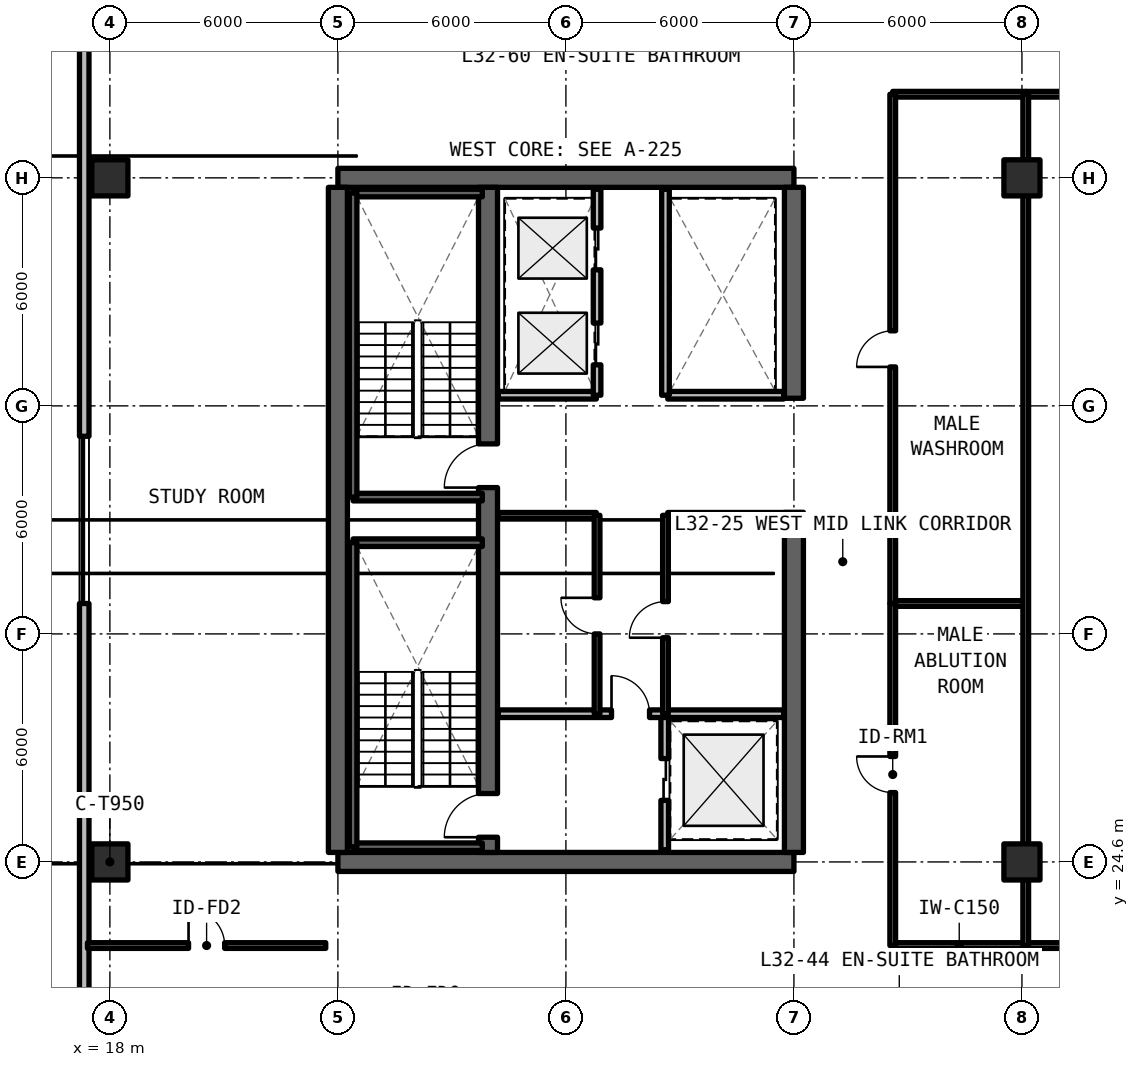
"""IFC4 building model, lengths in metres.
Left out: names, types, materials, properties, quantities, classifications, styles, units other than length and angle.
Written with IfcOpenShell. Run it as: python <this file> out.ifc"""

import sys

from ifc_helpers import new_model, si_unit, direction, frame, frame_2d, origin, origin_2d, place, context, subcontext, project, spatial, rectangle, extrude, element, fill, save


model = new_model("IFC4")
c1 = context("Model", 3, precision=1e-05, world=origin(), true_north=direction((0.0, 1.0)))
c2 = subcontext(c1, "Body", "Model", "MODEL_VIEW")
j1 = project(units=[si_unit("LENGTHUNIT", "METRE"), si_unit("PLANEANGLEUNIT", "RADIAN")], contexts=[c1])
p1 = place(None, origin())
s1 = spatial("IfcSite", under=j1, at=p1, CompositionType="ELEMENT")
p2 = place(p1, origin())
s2 = spatial("IfcBuilding", under=s1, at=p2, CompositionType="ELEMENT")
p3 = place(p2, frame((0.0, 0.0, 115.83)))
s3 = spatial("IfcBuildingStorey", under=s2, at=p3, CompositionType="ELEMENT", Elevation=115.83)
for number, where, z_axis, x_axis in (
    (1, (24.0, 24.6, 0.0), (0.0, 0.0, 1.0), (1.0, 0.0, 0.0)),
    (2, (36.0, 42.6, 0.0), (0.0, 0.0, 1.0), (-1.0, 0.0, 0.0)),
):
    element("IfcWall", number, at=place(p3, frame(where, z_axis=z_axis, x_axis=x_axis)), inside=s3, PredefinedType="SHEAR", context=c2, shape_type="SweptSolid", body=[
        extrude(rectangle(XDim=12.0, YDim=0.5, at=frame_2d((6.0, 0.0))), origin(), (0.0, 0.0, 1.0), 3.63),
    ])
p4 = place(p3, frame((24.0, 24.85, 0.0), z_axis=(0.0, 0.0, 1.0), x_axis=(0.0, 1.0, 0.0)))
e3 = element("IfcWall", 3, at=p4, inside=s3, PredefinedType="SHEAR", context=c2, shape_type="SweptSolid", body=[
    extrude(rectangle(XDim=17.5, YDim=0.5, at=frame_2d((8.75, 0.0))), origin(), (0.0, 0.0, 1.0), 3.63),
])
p5 = place(p3, frame((36.0, 24.85, 0.0), z_axis=(0.0, 0.0, 1.0), x_axis=(0.0, 1.0, 0.0)))
e4 = element("IfcWall", 4, at=p5, inside=s3, PredefinedType="SHEAR", context=c2, shape_type="SweptSolid", body=[
    extrude(rectangle(XDim=8.95, YDim=0.5, at=frame_2d((4.475, 0.0))), origin(), (0.0, 0.0, 1.0), 3.63),
])
p6 = place(p3, frame((36.0, 36.8, 0.0), z_axis=(0.0, 0.0, 1.0), x_axis=(0.0, 1.0, 0.0)))
e5 = element("IfcWall", 5, at=p6, inside=s3, PredefinedType="SHEAR", context=c2, shape_type="SweptSolid", body=[
    extrude(rectangle(XDim=5.55, YDim=0.5, at=frame_2d((2.775, 0.0))), origin(), (0.0, 0.0, 1.0), 3.63),
])
p7 = place(p3, frame((27.95, 24.85, 0.0), z_axis=(0.0, 0.0, 1.0), x_axis=(0.0, 1.0, 0.0)))
e6 = element("IfcWall", 6, at=p7, inside=s3, PredefinedType="SHEAR", context=c2, shape_type="SweptSolid", body=[
    extrude(rectangle(XDim=17.5, YDim=0.5, at=frame_2d((8.75, 0.0))), origin(), (0.0, 0.0, 1.0), 3.63),
])
p8 = place(p7, frame((0.4, 0.0, 0.0)))
e7 = element("IfcOpeningElement", 7, at=p8, cuts=e6, PredefinedType="OPENING", context=c2, shape_type="SweptSolid", body=[
    extrude(rectangle(XDim=1.15, YDim=2.15, at=frame_2d((0.575, 1.075))), frame((0.0, 0.26, 0.0), z_axis=(0.0, -1.0, 0.0), x_axis=(1.0, 0.0, 0.0)), (0.0, 0.0, 1.0), 0.52),
])
p9 = place(p7, frame((9.6, 0.0, 0.0)))
e8 = element("IfcOpeningElement", 8, at=p9, cuts=e6, PredefinedType="OPENING", context=c2, shape_type="SweptSolid", body=[
    extrude(rectangle(XDim=1.15, YDim=2.15, at=frame_2d((0.575, 1.075))), frame((0.0, 0.26, 0.0), z_axis=(0.0, -1.0, 0.0), x_axis=(1.0, 0.0, 0.0)), (0.0, 0.0, 1.0), 0.52),
])
for number, where, z_axis, x_axis in (
    (9, (18.0, 24.6, 0.0), (0.0, 0.0, 1.0), (1.0, 0.0, 0.0)),
    (10, (18.0, 42.6, 0.0), (0.0, 0.0, 1.0), (1.0, 0.0, 0.0)),
    (11, (42.0, 24.6, 0.0), (0.0, 0.0, 1.0), (1.0, 0.0, 0.0)),
    (12, (42.0, 42.6, 0.0), (0.0, 0.0, 1.0), (1.0, 0.0, 0.0)),
):
    element("IfcColumn", number, at=place(p3, frame(where, z_axis=z_axis, x_axis=x_axis)), inside=s3, PredefinedType="COLUMN", context=c2, shape_type="SweptSolid", body=[
        extrude(rectangle(XDim=0.95, YDim=0.95, at=origin_2d()), origin(), (0.0, 0.0, 1.0), 3.63),
    ])
p10 = place(p3, frame((17.325, 53.348, 0.0), z_axis=(0.0, 0.0, 1.0), x_axis=(0.0, -1.0, 0.0)))
e13 = element("IfcWall", 13, at=p10, inside=s3, PredefinedType="SOLIDWALL", context=c2, shape_type="SweptSolid", body=[
    extrude(rectangle(XDim=39.496, YDim=0.25, at=frame_2d((19.748, 0.0))), origin(), (0.0, 0.0, 1.0), 3.41),
])
p11 = place(p10, frame((1.698, 0.0, 0.0)))
e14 = element("IfcOpeningElement", 14, at=p11, cuts=e13, PredefinedType="OPENING", context=c2, shape_type="SweptSolid", body=[
    extrude(rectangle(XDim=1.1, YDim=2.15, at=frame_2d((0.55, 1.075))), frame((0.0, 0.135, 0.0), z_axis=(0.0, -1.0, 0.0), x_axis=(1.0, 0.0, 0.0)), (0.0, 0.0, 1.0), 0.27),
])
p12 = place(p10, frame((17.548, 0.0, 0.78)))
e15 = element("IfcOpeningElement", 15, at=p12, cuts=e13, PredefinedType="OPENING", context=c2, shape_type="SweptSolid", body=[
    extrude(rectangle(XDim=4.4, YDim=1.66, at=frame_2d((2.2, 0.83))), frame((0.0, 0.135, 0.0), z_axis=(0.0, -1.0, 0.0), x_axis=(1.0, 0.0, 0.0)), (0.0, 0.0, 1.0), 0.27),
])
p13 = place(p10, frame((35.642, 0.0, 0.78)))
e16 = element("IfcOpeningElement", 16, at=p13, cuts=e13, PredefinedType="OPENING", context=c2, shape_type="SweptSolid", body=[
    extrude(rectangle(XDim=1.4, YDim=1.65, at=frame_2d((0.7, 0.825))), frame((0.0, 0.135, 0.0), z_axis=(0.0, -1.0, 0.0), x_axis=(1.0, 0.0, 0.0)), (0.0, 0.0, 1.0), 0.27),
])
p14 = place(p3, frame((32.6, 24.92, 0.0), z_axis=(0.0, 0.0, 1.0), x_axis=(0.0, 1.0, 0.0)))
e17 = element("IfcWall", 17, at=p14, inside=s3, PredefinedType="SOLIDWALL", context=c2, shape_type="SweptSolid", body=[
    extrude(rectangle(XDim=3.58, YDim=0.2, at=frame_2d((1.79, 0.0))), origin(), (0.0, 0.0, 1.0), 2.63),
])
p15 = place(p14, frame((1.3, 0.0, 0.0)))
e18 = element("IfcOpeningElement", 18, at=p15, cuts=e17, PredefinedType="OPENING", context=c2, shape_type="SweptSolid", body=[
    extrude(rectangle(XDim=1.1, YDim=2.2, at=frame_2d((0.55, 1.1))), frame((0.0, 0.11, 0.0), z_axis=(0.0, -1.0, 0.0), x_axis=(1.0, 0.0, 0.0)), (0.0, 0.0, 1.0), 0.22),
])
p16 = place(p3, frame((28.22, 28.5, 0.0), z_axis=(0.0, 0.0, 1.0), x_axis=(1.0, 0.0, 0.0)))
e19 = element("IfcWall", 19, at=p16, inside=s3, PredefinedType="SOLIDWALL", context=c2, shape_type="SweptSolid", body=[
    extrude(rectangle(XDim=7.51, YDim=0.2, at=frame_2d((3.755, 0.0))), origin(), (0.0, 0.0, 1.0), 2.63),
])
p17 = place(p16, frame((2.98, 0.0, 0.0)))
e20 = element("IfcOpeningElement", 20, at=p17, cuts=e19, PredefinedType="OPENING", context=c2, shape_type="SweptSolid", body=[
    extrude(rectangle(XDim=1.0, YDim=2.15, at=frame_2d((0.5, 1.075))), frame((0.0, 0.11, 0.0), z_axis=(0.0, -1.0, 0.0), x_axis=(1.0, 0.0, 0.0)), (0.0, 0.0, 1.0), 0.22),
])
p18 = place(p3, frame((28.22, 33.72, 0.0), z_axis=(0.0, 0.0, 1.0), x_axis=(1.0, 0.0, 0.0)))
e21 = element("IfcWall", 21, at=p18, inside=s3, PredefinedType="SOLIDWALL", context=c2, shape_type="SweptSolid", body=[
    extrude(rectangle(XDim=2.58, YDim=0.15, at=frame_2d((1.29, 0.0))), origin(), (0.0, 0.0, 1.0), 2.63),
])
p19 = place(p3, frame((30.82, 28.5, 0.0), z_axis=(0.0, 0.0, 1.0), x_axis=(0.0, 1.0, 0.0)))
e22 = element("IfcWall", 22, at=p19, inside=s3, PredefinedType="SOLIDWALL", context=c2, shape_type="SweptSolid", body=[
    extrude(rectangle(XDim=5.22, YDim=0.15, at=frame_2d((2.61, 0.0))), origin(), (0.0, 0.0, 1.0), 2.63),
])
p20 = place(p19, frame((2.1, 0.0, 0.0)))
e23 = element("IfcOpeningElement", 23, at=p20, cuts=e22, PredefinedType="OPENING", context=c2, shape_type="SweptSolid", body=[
    extrude(rectangle(XDim=0.95, YDim=2.15, at=frame_2d((0.475, 1.075))), frame((0.0, 0.085, 0.0), z_axis=(0.0, -1.0, 0.0), x_axis=(1.0, 0.0, 0.0)), (0.0, 0.0, 1.0), 0.17),
])
p21 = place(p3, frame((32.68, 33.72, 0.0), z_axis=(0.0, 0.0, 1.0), x_axis=(1.0, 0.0, 0.0)))
e24 = element("IfcWall", 24, at=p21, inside=s3, PredefinedType="SOLIDWALL", context=c2, shape_type="SweptSolid", body=[
    extrude(rectangle(XDim=3.05, YDim=0.15, at=frame_2d((1.525, 0.0))), origin(), (0.0, 0.0, 1.0), 2.63),
])
p22 = place(p3, frame((32.62, 28.5, 0.0), z_axis=(0.0, 0.0, 1.0), x_axis=(0.0, 1.0, 0.0)))
e25 = element("IfcWall", 25, at=p22, inside=s3, PredefinedType="SOLIDWALL", context=c2, shape_type="SweptSolid", body=[
    extrude(rectangle(XDim=5.22, YDim=0.15, at=frame_2d((2.61, 0.0))), origin(), (0.0, 0.0, 1.0), 2.63),
])
p23 = place(p22, frame((2.0, 0.0, 0.0)))
e26 = element("IfcOpeningElement", 26, at=p23, cuts=e25, PredefinedType="OPENING", context=c2, shape_type="SweptSolid", body=[
    extrude(rectangle(XDim=0.95, YDim=2.15, at=frame_2d((0.475, 1.075))), frame((0.0, 0.085, 0.0), z_axis=(0.0, -1.0, 0.0), x_axis=(1.0, 0.0, 0.0)), (0.0, 0.0, 1.0), 0.17),
])
p24 = place(p3, frame((28.22, 36.88, 0.0), z_axis=(0.0, 0.0, 1.0), x_axis=(1.0, 0.0, 0.0)))
e27 = element("IfcWall", 27, at=p24, inside=s3, PredefinedType="SOLIDWALL", context=c2, shape_type="SweptSolid", body=[
    extrude(rectangle(XDim=2.58, YDim=0.2, at=frame_2d((1.29, 0.0))), origin(), (0.0, 0.0, 1.0), 2.63),
])
p25 = place(p3, frame((30.82, 36.88, 0.0), z_axis=(0.0, 0.0, 1.0), x_axis=(0.0, 1.0, 0.0)))
e28 = element("IfcWall", 28, at=p25, inside=s3, PredefinedType="SOLIDWALL", context=c2, shape_type="SweptSolid", body=[
    extrude(rectangle(XDim=5.42, YDim=0.2, at=frame_2d((2.71, 0.0))), origin(), (0.0, 0.0, 1.0), 2.63),
])
p26 = place(p25, frame((0.8, 0.0, 0.0)))
e29 = element("IfcOpeningElement", 29, at=p26, cuts=e28, PredefinedType="OPENING", context=c2, shape_type="SweptSolid", body=[
    extrude(rectangle(XDim=1.1, YDim=2.2, at=frame_2d((0.55, 1.1))), frame((0.0, 0.11, 0.0), z_axis=(0.0, -1.0, 0.0), x_axis=(1.0, 0.0, 0.0)), (0.0, 0.0, 1.0), 0.22),
])
p27 = place(p25, frame((3.3, 0.0, 0.0)))
e30 = element("IfcOpeningElement", 30, at=p27, cuts=e28, PredefinedType="OPENING", context=c2, shape_type="SweptSolid", body=[
    extrude(rectangle(XDim=1.1, YDim=2.2, at=frame_2d((0.55, 1.1))), frame((0.0, 0.11, 0.0), z_axis=(0.0, -1.0, 0.0), x_axis=(1.0, 0.0, 0.0)), (0.0, 0.0, 1.0), 0.22),
])
p28 = place(p3, frame((32.68, 36.88, 0.0), z_axis=(0.0, 0.0, 1.0), x_axis=(1.0, 0.0, 0.0)))
e31 = element("IfcWall", 31, at=p28, inside=s3, PredefinedType="SOLIDWALL", context=c2, shape_type="SweptSolid", body=[
    extrude(rectangle(XDim=3.05, YDim=0.2, at=frame_2d((1.525, 0.0))), origin(), (0.0, 0.0, 1.0), 2.63),
])
p29 = place(p3, frame((32.62, 36.88, 0.0), z_axis=(0.0, 0.0, 1.0), x_axis=(0.0, 1.0, 0.0)))
e32 = element("IfcWall", 32, at=p29, inside=s3, PredefinedType="SOLIDWALL", context=c2, shape_type="SweptSolid", body=[
    extrude(rectangle(XDim=5.42, YDim=0.2, at=frame_2d((2.71, 0.0))), origin(), (0.0, 0.0, 1.0), 2.63),
])
for number, where, z_axis, x_axis in (
    (33, (38.6, 22.4, 0.0), (0.0, 0.0, 1.0), (1.0, 0.0, 0.0)),
    (34, (38.6, 31.4, 0.0), (0.0, 0.0, 1.0), (1.0, 0.0, 0.0)),
):
    element("IfcWall", number, at=place(p3, frame(where, z_axis=z_axis, x_axis=x_axis)), inside=s3, PredefinedType="SOLIDWALL", context=c2, shape_type="SweptSolid", body=[
        extrude(rectangle(XDim=3.5, YDim=0.15, at=frame_2d((1.75, 0.0))), origin(), (0.0, 0.0, 1.0), 2.63),
    ])
p30 = place(p3, frame((38.6, 22.4, 0.0), z_axis=(0.0, 0.0, 1.0), x_axis=(0.0, 1.0, 0.0)))
e35 = element("IfcWall", 35, at=p30, inside=s3, PredefinedType="SOLIDWALL", context=c2, shape_type="SweptSolid", body=[
    extrude(rectangle(XDim=9.0, YDim=0.15, at=frame_2d((4.5, 0.0))), origin(), (0.0, 0.0, 1.0), 2.63),
])
p31 = place(p30, frame((4.025, 0.0, 0.0)))
e36 = element("IfcOpeningElement", 36, at=p31, cuts=e35, PredefinedType="OPENING", context=c2, shape_type="SweptSolid", body=[
    extrude(rectangle(XDim=0.95, YDim=2.15, at=frame_2d((0.475, 1.075))), frame((0.0, 0.085, 0.0), z_axis=(0.0, -1.0, 0.0), x_axis=(1.0, 0.0, 0.0)), (0.0, 0.0, 1.0), 0.17),
])
p32 = place(p3, frame((38.6, 44.8, 0.0), z_axis=(0.0, 0.0, 1.0), x_axis=(1.0, 0.0, 0.0)))
e37 = element("IfcWall", 37, at=p32, inside=s3, PredefinedType="SOLIDWALL", context=c2, shape_type="SweptSolid", body=[
    extrude(rectangle(XDim=3.5, YDim=0.15, at=frame_2d((1.75, 0.0))), origin(), (0.0, 0.0, 1.0), 2.63),
])
p33 = place(p3, frame((38.6, 31.4, 0.0), z_axis=(0.0, 0.0, 1.0), x_axis=(0.0, 1.0, 0.0)))
e38 = element("IfcWall", 38, at=p33, inside=s3, PredefinedType="SOLIDWALL", context=c2, shape_type="SweptSolid", body=[
    extrude(rectangle(XDim=13.4, YDim=0.15, at=frame_2d((6.7, 0.0))), origin(), (0.0, 0.0, 1.0), 2.63),
])
p34 = place(p33, frame((6.225, 0.0, 0.0)))
e39 = element("IfcOpeningElement", 39, at=p34, cuts=e38, PredefinedType="OPENING", context=c2, shape_type="SweptSolid", body=[
    extrude(rectangle(XDim=0.95, YDim=2.15, at=frame_2d((0.475, 1.075))), frame((0.0, 0.085, 0.0), z_axis=(0.0, -1.0, 0.0), x_axis=(1.0, 0.0, 0.0)), (0.0, 0.0, 1.0), 0.17),
])
p35 = place(p3, frame((42.1, 22.4, 0.0), z_axis=(0.0, 0.0, 1.0), x_axis=(1.0, 0.0, 0.0)))
e40 = element("IfcWall", 40, at=p35, inside=s3, PredefinedType="SOLIDWALL", context=c2, shape_type="SweptSolid", body=[
    extrude(rectangle(XDim=29.0, YDim=0.15, at=frame_2d((14.5, 0.0))), origin(), (0.0, 0.0, 1.0), 2.63),
])
p36 = place(p35, frame((13.8, 0.0, 0.0)))
e41 = element("IfcOpeningElement", 41, at=p36, cuts=e40, PredefinedType="OPENING", context=c2, shape_type="SweptSolid", body=[
    extrude(rectangle(XDim=1.4, YDim=2.15, at=frame_2d((0.7, 1.075))), frame((0.0, 0.085, 0.0), z_axis=(0.0, -1.0, 0.0), x_axis=(1.0, 0.0, 0.0)), (0.0, 0.0, 1.0), 0.17),
])
p37 = place(p3, frame((42.1, 44.8, 0.0), z_axis=(0.0, 0.0, 1.0), x_axis=(1.0, 0.0, 0.0)))
e42 = element("IfcWall", 42, at=p37, inside=s3, PredefinedType="SOLIDWALL", context=c2, shape_type="SweptSolid", body=[
    extrude(rectangle(XDim=29.0, YDim=0.15, at=frame_2d((14.5, 0.0))), origin(), (0.0, 0.0, 1.0), 2.63),
])
p38 = place(p3, frame((42.1, 22.4, 0.0), z_axis=(0.0, 0.0, 1.0), x_axis=(0.0, 1.0, 0.0)))
e43 = element("IfcWall", 43, at=p38, inside=s3, PredefinedType="SOLIDWALL", context=c2, shape_type="SweptSolid", body=[
    extrude(rectangle(XDim=22.4, YDim=0.15, at=frame_2d((11.2, 0.0))), origin(), (0.0, 0.0, 1.0), 2.63),
])
p39 = place(p3, frame((17.41, 22.4, 0.0), z_axis=(0.0, 0.0, 1.0), x_axis=(1.0, 0.0, 0.0)))
e44 = element("IfcWall", 44, at=p39, inside=s3, PredefinedType="SOLIDWALL", context=c2, shape_type="SweptSolid", body=[
    extrude(rectangle(XDim=6.27, YDim=0.15, at=frame_2d((3.135, 0.0))), origin(), (0.0, 0.0, 1.0), 2.63),
])
p40 = place(p39, frame((2.66, 0.0, 0.0)))
e45 = element("IfcOpeningElement", 45, at=p40, cuts=e44, PredefinedType="OPENING", context=c2, shape_type="SweptSolid", body=[
    extrude(rectangle(XDim=0.95, YDim=2.15, at=frame_2d((0.475, 1.075))), frame((0.0, 0.085, 0.0), z_axis=(0.0, -1.0, 0.0), x_axis=(1.0, 0.0, 0.0)), (0.0, 0.0, 1.0), 0.17),
])
for number, where, z_axis, x_axis in (
    (46, (24.4, 25.0, 0.0), (0.0, 0.0, 1.0), (1.0, 0.0, 0.0)),
    (47, (27.8, 33.0, 0.0), (0.0, 0.0, 1.0), (-1.0, 0.0, 0.0)),
):
    element("IfcWall", number, at=place(p3, frame(where, z_axis=z_axis, x_axis=x_axis)), inside=s3, PredefinedType="SOLIDWALL", context=c2, shape_type="SweptSolid", body=[
        extrude(rectangle(XDim=3.4, YDim=0.2, at=frame_2d((1.7, 0.0))), origin(), (0.0, 0.0, 1.0), 3.63),
    ])
p41 = place(p3, frame((24.4, 33.0, 0.0), z_axis=(0.0, 0.0, 1.0), x_axis=(0.0, -1.0, 0.0)))
e48 = element("IfcWall", 48, at=p41, inside=s3, PredefinedType="SOLIDWALL", context=c2, shape_type="SweptSolid", body=[
    extrude(rectangle(XDim=8.0, YDim=0.2, at=frame_2d((4.0, 0.0))), origin(), (0.0, 0.0, 1.0), 3.63),
])
for number, where, z_axis, x_axis in (
    (49, (24.4, 34.2, 0.0), (0.0, 0.0, 1.0), (1.0, 0.0, 0.0)),
    (50, (27.8, 42.2, 0.0), (0.0, 0.0, 1.0), (-1.0, 0.0, 0.0)),
):
    element("IfcWall", number, at=place(p3, frame(where, z_axis=z_axis, x_axis=x_axis)), inside=s3, PredefinedType="SOLIDWALL", context=c2, shape_type="SweptSolid", body=[
        extrude(rectangle(XDim=3.4, YDim=0.2, at=frame_2d((1.7, 0.0))), origin(), (0.0, 0.0, 1.0), 3.63),
    ])
p42 = place(p3, frame((24.4, 42.2, 0.0), z_axis=(0.0, 0.0, 1.0), x_axis=(0.0, -1.0, 0.0)))
e51 = element("IfcWall", 51, at=p42, inside=s3, PredefinedType="SOLIDWALL", context=c2, shape_type="SweptSolid", body=[
    extrude(rectangle(XDim=8.0, YDim=0.2, at=frame_2d((4.0, 0.0))), origin(), (0.0, 0.0, 1.0), 3.63),
])
p43 = place(p12, origin())
e52 = element("IfcWindow", 52, at=p43, inside=s3, PartitioningType="SINGLE_PANEL", PredefinedType="WINDOW", context=c2, shape_type="SweptSolid", body=[
    extrude(rectangle(XDim=4.4, YDim=1.66, at=frame_2d((2.2, 0.83))), frame((0.0, 0.03, 0.0), z_axis=(0.0, -1.0, 0.0), x_axis=(1.0, 0.0, 0.0)), (0.0, 0.0, 1.0), 0.06),
])
fill(e15, e52)
p44 = place(p15, origin())
e53 = element("IfcDoor", 53, at=p44, inside=s3, OperationType="SLIDING_TO_LEFT", PredefinedType="DOOR", context=c2, shape_type="SweptSolid", body=[
    extrude(rectangle(XDim=1.1, YDim=2.2, at=frame_2d((0.55, 1.1))), frame((0.0, 0.025, 0.0), z_axis=(0.0, -1.0, 0.0), x_axis=(1.0, 0.0, 0.0)), (0.0, 0.0, 1.0), 0.05),
])
fill(e18, e53)
p45 = place(p17, origin())
e54 = element("IfcDoor", 54, at=p45, inside=s3, OperationType="SINGLE_SWING_LEFT", PredefinedType="DOOR", context=c2, shape_type="SweptSolid", body=[
    extrude(rectangle(XDim=1.0, YDim=2.15, at=frame_2d((0.5, 1.075))), frame((0.0, 0.025, 0.0), z_axis=(0.0, -1.0, 0.0), x_axis=(1.0, 0.0, 0.0)), (0.0, 0.0, 1.0), 0.05),
])
fill(e20, e54)
p46 = place(p20, origin())
e55 = element("IfcDoor", 55, at=p46, inside=s3, OperationType="SINGLE_SWING_RIGHT", PredefinedType="DOOR", context=c2, shape_type="SweptSolid", body=[
    extrude(rectangle(XDim=0.95, YDim=2.15, at=frame_2d((0.475, 1.075))), frame((0.0, 0.025, 0.0), z_axis=(0.0, -1.0, 0.0), x_axis=(1.0, 0.0, 0.0)), (0.0, 0.0, 1.0), 0.05),
])
fill(e23, e55)
p47 = place(p23, origin())
e56 = element("IfcDoor", 56, at=p47, inside=s3, OperationType="SINGLE_SWING_LEFT", PredefinedType="DOOR", context=c2, shape_type="SweptSolid", body=[
    extrude(rectangle(XDim=0.95, YDim=2.15, at=frame_2d((0.475, 1.075))), frame((0.0, 0.025, 0.0), z_axis=(0.0, -1.0, 0.0), x_axis=(1.0, 0.0, 0.0)), (0.0, 0.0, 1.0), 0.05),
])
fill(e26, e56)
p48 = place(p26, origin())
e57 = element("IfcDoor", 57, at=p48, inside=s3, OperationType="SLIDING_TO_LEFT", PredefinedType="DOOR", context=c2, shape_type="SweptSolid", body=[
    extrude(rectangle(XDim=1.1, YDim=2.2, at=frame_2d((0.55, 1.1))), frame((0.0, 0.025, 0.0), z_axis=(0.0, -1.0, 0.0), x_axis=(1.0, 0.0, 0.0)), (0.0, 0.0, 1.0), 0.05),
])
fill(e29, e57)
p49 = place(p27, origin())
e58 = element("IfcDoor", 58, at=p49, inside=s3, OperationType="SLIDING_TO_RIGHT", PredefinedType="DOOR", context=c2, shape_type="SweptSolid", body=[
    extrude(rectangle(XDim=1.1, YDim=2.2, at=frame_2d((0.55, 1.1))), frame((0.0, 0.025, 0.0), z_axis=(0.0, -1.0, 0.0), x_axis=(1.0, 0.0, 0.0)), (0.0, 0.0, 1.0), 0.05),
])
fill(e30, e58)
p50 = place(p31, origin())
e59 = element("IfcDoor", 59, at=p50, inside=s3, OperationType="SINGLE_SWING_RIGHT", PredefinedType="DOOR", context=c2, shape_type="SweptSolid", body=[
    extrude(rectangle(XDim=0.95, YDim=2.15, at=frame_2d((0.475, 1.075))), frame((0.0, 0.025, 0.0), z_axis=(0.0, -1.0, 0.0), x_axis=(1.0, 0.0, 0.0)), (0.0, 0.0, 1.0), 0.05),
])
fill(e36, e59)
p51 = place(p34, origin())
e60 = element("IfcDoor", 60, at=p51, inside=s3, OperationType="SINGLE_SWING_LEFT", PredefinedType="DOOR", context=c2, shape_type="SweptSolid", body=[
    extrude(rectangle(XDim=0.95, YDim=2.15, at=frame_2d((0.475, 1.075))), frame((0.0, 0.025, 0.0), z_axis=(0.0, -1.0, 0.0), x_axis=(1.0, 0.0, 0.0)), (0.0, 0.0, 1.0), 0.05),
])
fill(e39, e60)
p52 = place(p40, origin())
e61 = element("IfcDoor", 61, at=p52, inside=s3, OperationType="SINGLE_SWING_LEFT", PredefinedType="DOOR", context=c2, shape_type="SweptSolid", body=[
    extrude(rectangle(XDim=0.95, YDim=2.15, at=frame_2d((0.475, 1.075))), frame((0.0, 0.025, 0.0), z_axis=(0.0, -1.0, 0.0), x_axis=(1.0, 0.0, 0.0)), (0.0, 0.0, 1.0), 0.05),
])
fill(e45, e61)
p53 = place(p8, origin())
e62 = element("IfcDoor", 62, at=p53, inside=s3, OperationType="SINGLE_SWING_LEFT", PredefinedType="DOOR", context=c2, shape_type="SweptSolid", body=[
    extrude(rectangle(XDim=1.15, YDim=2.15, at=frame_2d((0.575, 1.075))), frame((0.0, 0.025, 0.0), z_axis=(0.0, -1.0, 0.0), x_axis=(1.0, 0.0, 0.0)), (0.0, 0.0, 1.0), 0.05),
])
fill(e7, e62)
p54 = place(p9, origin())
e63 = element("IfcDoor", 63, at=p54, inside=s3, OperationType="SINGLE_SWING_RIGHT", PredefinedType="DOOR", context=c2, shape_type="SweptSolid", body=[
    extrude(rectangle(XDim=1.15, YDim=2.15, at=frame_2d((0.575, 1.075))), frame((0.0, 0.025, 0.0), z_axis=(0.0, -1.0, 0.0), x_axis=(1.0, 0.0, 0.0)), (0.0, 0.0, 1.0), 0.05),
])
fill(e8, e63)
save(model, sys.argv[1])
